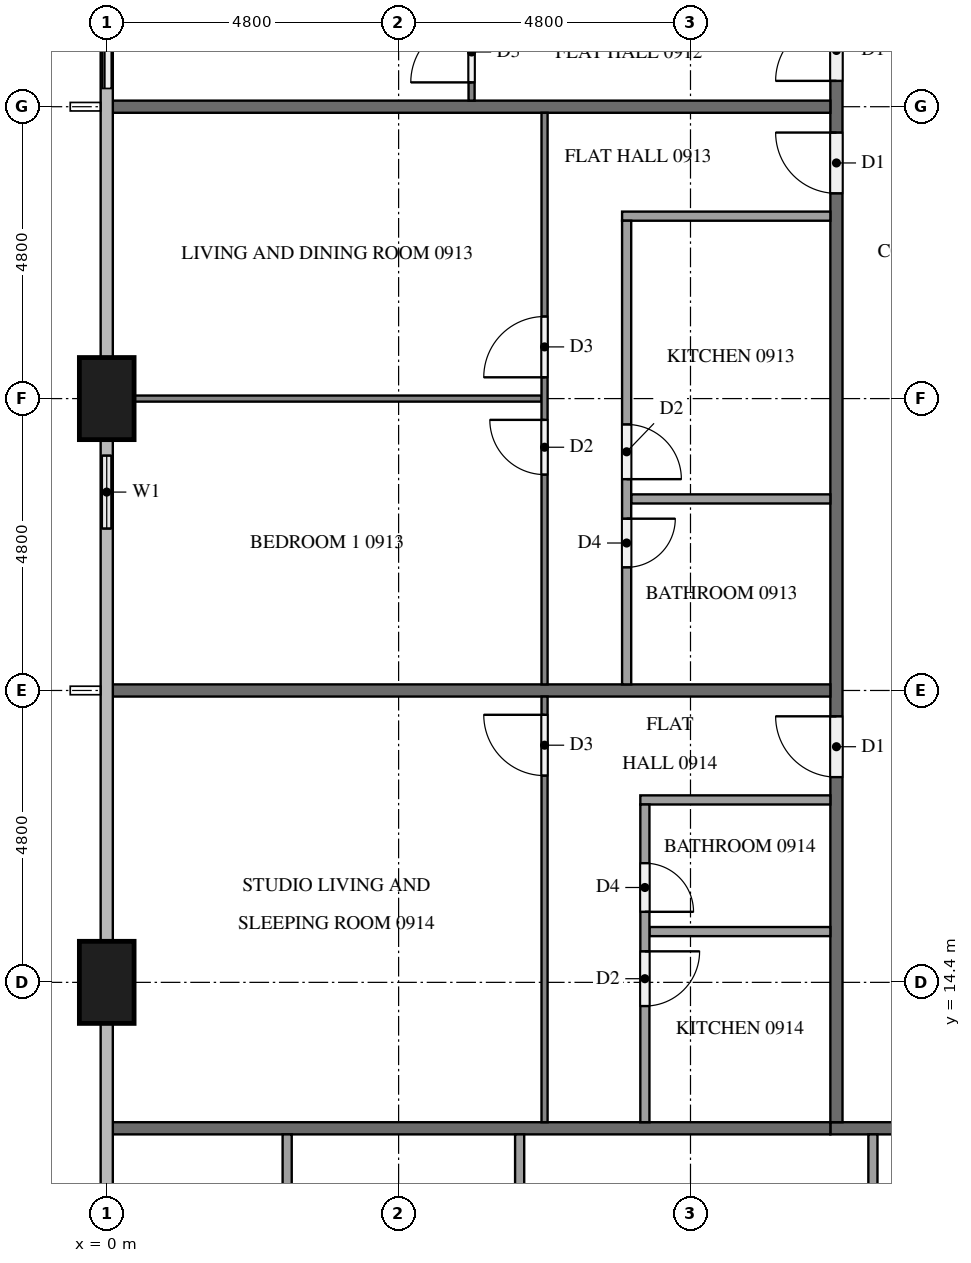
"""IFC4 building model, lengths in metres.
Left out: names, types, materials, properties, quantities, classifications, styles, units other than length and angle.
Written with IfcOpenShell. Run it as: python <this file> out.ifc"""

import sys

from ifc_helpers import new_model, si_unit, direction, frame, frame_2d, origin, origin_2d, place, context, subcontext, project, spatial, rectangle, extrude, element, fill, save


model = new_model("IFC4")
c1 = context("Model", 3, precision=1e-05, world=origin(), true_north=direction((0.0, 1.0)))
c2 = subcontext(c1, "Body", "Model", "MODEL_VIEW")
j1 = project(units=[si_unit("LENGTHUNIT", "METRE"), si_unit("PLANEANGLEUNIT", "RADIAN")], contexts=[c1])
p1 = place(None, origin())
s1 = spatial("IfcSite", under=j1, at=p1, CompositionType="ELEMENT")
p2 = place(p1, origin())
s2 = spatial("IfcBuilding", under=s1, at=p2, CompositionType="ELEMENT")
p3 = place(p2, frame((0.0, 0.0, 39.9)))
s3 = spatial("IfcBuildingStorey", under=s2, at=p3, CompositionType="ELEMENT", Elevation=39.9)
for number, where, z_axis, x_axis in (
    (1, (0.0, 24.0, 0.0), (0.0, 0.0, 1.0), (0.0, 1.0, 0.0)),
    (2, (0.0, 14.4, 0.0), (0.0, 0.0, 1.0), (0.0, 1.0, 0.0)),
):
    element("IfcColumn", number, at=place(p3, frame(where, z_axis=z_axis, x_axis=x_axis)), inside=s3, PredefinedType="COLUMN", context=c2, shape_type="SweptSolid", body=[
        extrude(rectangle(XDim=1.35, YDim=0.9, at=origin_2d()), origin(), (0.0, 0.0, 1.0), 3.2),
    ])
p4 = place(p3, frame((0.0, 31.2, 0.0), z_axis=(0.0, 0.0, 1.0), x_axis=(0.0, -1.0, 0.0)))
e3 = element("IfcWall", 3, at=p4, inside=s3, PredefinedType="SOLIDWALL", context=c2, shape_type="SweptSolid", body=[
    extrude(rectangle(XDim=2.4, YDim=0.15, at=frame_2d((1.2, 0.0))), origin(), (0.0, 0.0, 1.0), 3.2),
])
p5 = place(p4, frame((0.3, 0.0, 0.0)))
e4 = element("IfcOpeningElement", 4, at=p5, cuts=e3, PredefinedType="OPENING", context=c2, shape_type="SweptSolid", body=[
    extrude(rectangle(XDim=1.8, YDim=2.4, at=frame_2d((0.9, 1.2))), frame((0.0, 0.085, 0.0), z_axis=(0.0, -1.0, 0.0), x_axis=(1.0, 0.0, 0.0)), (0.0, 0.0, 1.0), 0.17),
])
p6 = place(p3, frame((0.0, 23.325, 0.0), z_axis=(0.0, 0.0, 1.0), x_axis=(0.0, -1.0, 0.0)))
e5 = element("IfcWall", 5, at=p6, inside=s3, PredefinedType="SOLIDWALL", context=c2, shape_type="SweptSolid", body=[
    extrude(rectangle(XDim=1.725, YDim=0.15, at=frame_2d((0.862, 0.0))), origin(), (0.0, 0.0, 1.0), 3.2),
])
p7 = place(p6, frame((0.262, 0.0, 0.9)))
e6 = element("IfcOpeningElement", 6, at=p7, cuts=e5, PredefinedType="OPENING", context=c2, shape_type="SweptSolid", body=[
    extrude(rectangle(XDim=1.2, YDim=1.4, at=frame_2d((0.6, 0.7))), frame((0.0, 0.085, 0.0), z_axis=(0.0, -1.0, 0.0), x_axis=(1.0, 0.0, 0.0)), (0.0, 0.0, 1.0), 0.17),
])
p8 = place(p3, frame((50.5, 12.0, 0.0), z_axis=(0.0, 0.0, 1.0), x_axis=(-1.0, 0.0, 0.0)))
e7 = element("IfcWall", 7, at=p8, inside=s3, PredefinedType="PARTITIONING", context=c2, shape_type="SweptSolid", body=[
    extrude(rectangle(XDim=38.6, YDim=0.2, at=frame_2d((19.3, 0.0))), origin(), (0.0, 0.0, 1.0), 3.2),
])
p9 = place(p8, frame((36.525, 0.0, 0.0)))
e8 = element("IfcOpeningElement", 8, at=p9, cuts=e7, PredefinedType="OPENING", context=c2, shape_type="SweptSolid", body=[
    extrude(rectangle(XDim=1.0, YDim=2.1, at=frame_2d((0.5, 1.05))), frame((0.0, 0.11, 0.0), z_axis=(0.0, -1.0, 0.0), x_axis=(1.0, 0.0, 0.0)), (0.0, 0.0, 1.0), 0.22),
])
p10 = place(p8, frame((24.525, 0.0, 0.0)))
e9 = element("IfcOpeningElement", 9, at=p10, cuts=e7, PredefinedType="OPENING", context=c2, shape_type="SweptSolid", body=[
    extrude(rectangle(XDim=1.0, YDim=2.1, at=frame_2d((0.5, 1.05))), frame((0.0, 0.11, 0.0), z_axis=(0.0, -1.0, 0.0), x_axis=(1.0, 0.0, 0.0)), (0.0, 0.0, 1.0), 0.22),
])
p11 = place(p8, frame((22.675, 0.0, 0.0)))
e10 = element("IfcOpeningElement", 10, at=p11, cuts=e7, PredefinedType="OPENING", context=c2, shape_type="SweptSolid", body=[
    extrude(rectangle(XDim=1.0, YDim=2.1, at=frame_2d((0.5, 1.05))), frame((0.0, 0.11, 0.0), z_axis=(0.0, -1.0, 0.0), x_axis=(1.0, 0.0, 0.0)), (0.0, 0.0, 1.0), 0.22),
])
p12 = place(p8, frame((8.275, 0.0, 0.0)))
e11 = element("IfcOpeningElement", 11, at=p12, cuts=e7, PredefinedType="OPENING", context=c2, shape_type="SweptSolid", body=[
    extrude(rectangle(XDim=1.0, YDim=2.1, at=frame_2d((0.5, 1.05))), frame((0.0, 0.11, 0.0), z_axis=(0.0, -1.0, 0.0), x_axis=(1.0, 0.0, 0.0)), (0.0, 0.0, 1.0), 0.22),
])
p13 = place(p3, frame((12.0, 12.1, 0.0), z_axis=(0.0, 0.0, 1.0), x_axis=(0.0, 1.0, 0.0)))
e12 = element("IfcWall", 12, at=p13, inside=s3, PredefinedType="PARTITIONING", context=c2, shape_type="SweptSolid", body=[
    extrude(rectangle(XDim=28.6, YDim=0.2, at=frame_2d((14.3, 0.0))), origin(), (0.0, 0.0, 1.0), 3.2),
])
p14 = place(p13, frame((26.725, 0.0, 0.0)))
e13 = element("IfcOpeningElement", 13, at=p14, cuts=e12, PredefinedType="OPENING", context=c2, shape_type="SweptSolid", body=[
    extrude(rectangle(XDim=1.0, YDim=2.1, at=frame_2d((0.5, 1.05))), frame((0.0, 0.11, 0.0), z_axis=(0.0, -1.0, 0.0), x_axis=(1.0, 0.0, 0.0)), (0.0, 0.0, 1.0), 0.22),
])
p15 = place(p13, frame((17.125, 0.0, 0.0)))
e14 = element("IfcOpeningElement", 14, at=p15, cuts=e12, PredefinedType="OPENING", context=c2, shape_type="SweptSolid", body=[
    extrude(rectangle(XDim=1.0, YDim=2.1, at=frame_2d((0.5, 1.05))), frame((0.0, 0.11, 0.0), z_axis=(0.0, -1.0, 0.0), x_axis=(1.0, 0.0, 0.0)), (0.0, 0.0, 1.0), 0.22),
])
p16 = place(p13, frame((15.275, 0.0, 0.0)))
e15 = element("IfcOpeningElement", 15, at=p16, cuts=e12, PredefinedType="OPENING", context=c2, shape_type="SweptSolid", body=[
    extrude(rectangle(XDim=1.0, YDim=2.1, at=frame_2d((0.5, 1.05))), frame((0.0, 0.11, 0.0), z_axis=(0.0, -1.0, 0.0), x_axis=(1.0, 0.0, 0.0)), (0.0, 0.0, 1.0), 0.22),
])
p17 = place(p13, frame((5.675, 0.0, 0.0)))
e16 = element("IfcOpeningElement", 16, at=p17, cuts=e12, PredefinedType="OPENING", context=c2, shape_type="SweptSolid", body=[
    extrude(rectangle(XDim=1.0, YDim=2.1, at=frame_2d((0.5, 1.05))), frame((0.0, 0.11, 0.0), z_axis=(0.0, -1.0, 0.0), x_axis=(1.0, 0.0, 0.0)), (0.0, 0.0, 1.0), 0.22),
])
for number, where, z_axis, x_axis in (
    (17, (0.1, 12.0, 0.0), (0.0, 0.0, 1.0), (1.0, 0.0, 0.0)),
    (18, (0.1, 28.8, 0.0), (0.0, 0.0, 1.0), (1.0, 0.0, 0.0)),
    (19, (0.1, 19.2, 0.0), (0.0, 0.0, 1.0), (1.0, 0.0, 0.0)),
):
    element("IfcWall", number, at=place(p3, frame(where, z_axis=z_axis, x_axis=x_axis)), inside=s3, PredefinedType="PARTITIONING", context=c2, shape_type="SweptSolid", body=[
        extrude(rectangle(XDim=11.8, YDim=0.2, at=frame_2d((5.9, 0.0))), origin(), (0.0, 0.0, 1.0), 3.2),
    ])
for number, where, z_axis, x_axis in (
    (20, (6.79, 11.9, 0.0), (0.0, 0.0, 1.0), (0.0, -1.0, 0.0)),
    (21, (2.967, 11.9, 0.0), (0.0, 0.0, 1.0), (0.0, -1.0, 0.0)),
):
    element("IfcWall", number, at=place(p3, frame(where, z_axis=z_axis, x_axis=x_axis)), inside=s3, PredefinedType="PARTITIONING", context=c2, shape_type="SweptSolid", body=[
        extrude(rectangle(XDim=3.725, YDim=0.15, at=frame_2d((1.862, 0.0))), origin(), (0.0, 0.0, 1.0), 3.2),
    ])
p18 = place(p3, frame((12.6, 11.9, 0.0), z_axis=(0.0, 0.0, 1.0), x_axis=(0.0, -1.0, 0.0)))
e22 = element("IfcWall", 22, at=p18, inside=s3, PredefinedType="PARTITIONING", context=c2, shape_type="SweptSolid", body=[
    extrude(rectangle(XDim=3.875, YDim=0.15, at=frame_2d((1.938, 0.0))), origin(), (0.0, 0.0, 1.0), 3.2),
])
p19 = place(p3, frame((6.0, 28.9, 0.0), z_axis=(0.0, 0.0, 1.0), x_axis=(0.0, 1.0, 0.0)))
e23 = element("IfcWall", 23, at=p19, inside=s3, PredefinedType="PARTITIONING", context=c2, shape_type="SweptSolid", body=[
    extrude(rectangle(XDim=9.4, YDim=0.1, at=frame_2d((4.7, 0.0))), origin(), (0.0, 0.0, 1.0), 3.2),
])
p20 = place(p19, frame((0.3, 0.0, 0.0)))
e24 = element("IfcOpeningElement", 24, at=p20, cuts=e23, PredefinedType="OPENING", context=c2, shape_type="SweptSolid", body=[
    extrude(rectangle(XDim=1.0, YDim=2.1, at=frame_2d((0.5, 1.05))), frame((0.0, 0.06, 0.0), z_axis=(0.0, -1.0, 0.0), x_axis=(1.0, 0.0, 0.0)), (0.0, 0.0, 1.0), 0.12),
])
p21 = place(p19, frame((8.2, 0.0, 0.0)))
e25 = element("IfcOpeningElement", 25, at=p21, cuts=e23, PredefinedType="OPENING", context=c2, shape_type="SweptSolid", body=[
    extrude(rectangle(XDim=0.9, YDim=2.1, at=frame_2d((0.45, 1.05))), frame((0.0, 0.06, 0.0), z_axis=(0.0, -1.0, 0.0), x_axis=(1.0, 0.0, 0.0)), (0.0, 0.0, 1.0), 0.12),
])
p22 = place(p3, frame((7.15, 24.0, 0.0), z_axis=(0.0, 0.0, 1.0), x_axis=(-1.0, 0.0, 0.0)))
e26 = element("IfcWall", 26, at=p22, inside=s3, PredefinedType="PARTITIONING", context=c2, shape_type="SweptSolid", body=[
    extrude(rectangle(XDim=6.7, YDim=0.1, at=frame_2d((3.35, 0.0))), origin(), (0.0, 0.0, 1.0), 3.2),
])
p23 = place(p3, frame((7.2, 19.3, 0.0), z_axis=(0.0, 0.0, 1.0), x_axis=(0.0, 1.0, 0.0)))
e27 = element("IfcWall", 27, at=p23, inside=s3, PredefinedType="PARTITIONING", context=c2, shape_type="SweptSolid", body=[
    extrude(rectangle(XDim=9.4, YDim=0.1, at=frame_2d((4.7, 0.0))), origin(), (0.0, 0.0, 1.0), 3.2),
])
p24 = place(p23, frame((5.05, 0.0, 0.0)))
e28 = element("IfcOpeningElement", 28, at=p24, cuts=e27, PredefinedType="OPENING", context=c2, shape_type="SweptSolid", body=[
    extrude(rectangle(XDim=1.0, YDim=2.1, at=frame_2d((0.5, 1.05))), frame((0.0, 0.06, 0.0), z_axis=(0.0, -1.0, 0.0), x_axis=(1.0, 0.0, 0.0)), (0.0, 0.0, 1.0), 0.12),
])
p25 = place(p23, frame((3.45, 0.0, 0.0)))
e29 = element("IfcOpeningElement", 29, at=p25, cuts=e27, PredefinedType="OPENING", context=c2, shape_type="SweptSolid", body=[
    extrude(rectangle(XDim=0.9, YDim=2.1, at=frame_2d((0.45, 1.05))), frame((0.0, 0.06, 0.0), z_axis=(0.0, -1.0, 0.0), x_axis=(1.0, 0.0, 0.0)), (0.0, 0.0, 1.0), 0.12),
])
p26 = place(p3, frame((11.9, 22.35, 0.0), z_axis=(0.0, 0.0, 1.0), x_axis=(-1.0, 0.0, 0.0)))
e30 = element("IfcWall", 30, at=p26, inside=s3, PredefinedType="PARTITIONING", context=c2, shape_type="SweptSolid", body=[
    extrude(rectangle(XDim=3.275, YDim=0.15, at=frame_2d((1.637, 0.0))), origin(), (0.0, 0.0, 1.0), 3.2),
])
p27 = place(p3, frame((11.9, 27.0, 0.0), z_axis=(0.0, 0.0, 1.0), x_axis=(-1.0, 0.0, 0.0)))
e31 = element("IfcWall", 31, at=p27, inside=s3, PredefinedType="PARTITIONING", context=c2, shape_type="SweptSolid", body=[
    extrude(rectangle(XDim=3.425, YDim=0.15, at=frame_2d((1.712, 0.0))), origin(), (0.0, 0.0, 1.0), 3.2),
])
p28 = place(p3, frame((8.55, 26.925, 0.0), z_axis=(0.0, 0.0, 1.0), x_axis=(0.0, -1.0, 0.0)))
e32 = element("IfcWall", 32, at=p28, inside=s3, PredefinedType="PARTITIONING", context=c2, shape_type="SweptSolid", body=[
    extrude(rectangle(XDim=7.625, YDim=0.15, at=frame_2d((3.812, 0.0))), origin(), (0.0, 0.0, 1.0), 3.2),
])
p29 = place(p28, frame((3.35, 0.0, 0.0)))
e33 = element("IfcOpeningElement", 33, at=p29, cuts=e32, PredefinedType="OPENING", context=c2, shape_type="SweptSolid", body=[
    extrude(rectangle(XDim=0.9, YDim=2.1, at=frame_2d((0.45, 1.05))), frame((0.0, 0.085, 0.0), z_axis=(0.0, -1.0, 0.0), x_axis=(1.0, 0.0, 0.0)), (0.0, 0.0, 1.0), 0.17),
])
p30 = place(p28, frame((4.9, 0.0, 0.0)))
e34 = element("IfcOpeningElement", 34, at=p30, cuts=e32, PredefinedType="OPENING", context=c2, shape_type="SweptSolid", body=[
    extrude(rectangle(XDim=0.8, YDim=2.1, at=frame_2d((0.4, 1.05))), frame((0.0, 0.085, 0.0), z_axis=(0.0, -1.0, 0.0), x_axis=(1.0, 0.0, 0.0)), (0.0, 0.0, 1.0), 0.17),
])
p31 = place(p3, frame((7.2, 12.1, 0.0), z_axis=(0.0, 0.0, 1.0), x_axis=(0.0, 1.0, 0.0)))
e35 = element("IfcWall", 35, at=p31, inside=s3, PredefinedType="PARTITIONING", context=c2, shape_type="SweptSolid", body=[
    extrude(rectangle(XDim=7.0, YDim=0.1, at=frame_2d((3.5, 0.0))), origin(), (0.0, 0.0, 1.0), 3.2),
])
p32 = place(p31, frame((5.7, 0.0, 0.0)))
e36 = element("IfcOpeningElement", 36, at=p32, cuts=e35, PredefinedType="OPENING", context=c2, shape_type="SweptSolid", body=[
    extrude(rectangle(XDim=1.0, YDim=2.1, at=frame_2d((0.5, 1.05))), frame((0.0, 0.06, 0.0), z_axis=(0.0, -1.0, 0.0), x_axis=(1.0, 0.0, 0.0)), (0.0, 0.0, 1.0), 0.12),
])
p33 = place(p3, frame((11.9, 15.235, 0.0), z_axis=(0.0, 0.0, 1.0), x_axis=(-1.0, 0.0, 0.0)))
e37 = element("IfcWall", 37, at=p33, inside=s3, PredefinedType="PARTITIONING", context=c2, shape_type="SweptSolid", body=[
    extrude(rectangle(XDim=2.975, YDim=0.15, at=frame_2d((1.487, 0.0))), origin(), (0.0, 0.0, 1.0), 3.2),
])
p34 = place(p3, frame((11.9, 17.4, 0.0), z_axis=(0.0, 0.0, 1.0), x_axis=(-1.0, 0.0, 0.0)))
e38 = element("IfcWall", 38, at=p34, inside=s3, PredefinedType="PARTITIONING", context=c2, shape_type="SweptSolid", body=[
    extrude(rectangle(XDim=3.125, YDim=0.15, at=frame_2d((1.562, 0.0))), origin(), (0.0, 0.0, 1.0), 3.2),
])
p35 = place(p3, frame((8.85, 17.325, 0.0), z_axis=(0.0, 0.0, 1.0), x_axis=(0.0, -1.0, 0.0)))
e39 = element("IfcWall", 39, at=p35, inside=s3, PredefinedType="PARTITIONING", context=c2, shape_type="SweptSolid", body=[
    extrude(rectangle(XDim=5.225, YDim=0.15, at=frame_2d((2.612, 0.0))), origin(), (0.0, 0.0, 1.0), 3.2),
])
p36 = place(p35, frame((0.965, 0.0, 0.0)))
e40 = element("IfcOpeningElement", 40, at=p36, cuts=e39, PredefinedType="OPENING", context=c2, shape_type="SweptSolid", body=[
    extrude(rectangle(XDim=0.8, YDim=2.1, at=frame_2d((0.4, 1.05))), frame((0.0, 0.085, 0.0), z_axis=(0.0, -1.0, 0.0), x_axis=(1.0, 0.0, 0.0)), (0.0, 0.0, 1.0), 0.17),
])
p37 = place(p35, frame((2.415, 0.0, 0.0)))
e41 = element("IfcOpeningElement", 41, at=p37, cuts=e39, PredefinedType="OPENING", context=c2, shape_type="SweptSolid", body=[
    extrude(rectangle(XDim=0.9, YDim=2.1, at=frame_2d((0.45, 1.05))), frame((0.0, 0.085, 0.0), z_axis=(0.0, -1.0, 0.0), x_axis=(1.0, 0.0, 0.0)), (0.0, 0.0, 1.0), 0.17),
])
p38 = place(p5, origin())
e42 = element("IfcDoor", 42, at=p38, inside=s3, OperationType="SLIDING_TO_RIGHT", PredefinedType="DOOR", context=c2, shape_type="SweptSolid", body=[
    extrude(rectangle(XDim=1.8, YDim=2.4, at=frame_2d((0.9, 1.2))), frame((0.0, 0.025, 0.0), z_axis=(0.0, -1.0, 0.0), x_axis=(1.0, 0.0, 0.0)), (0.0, 0.0, 1.0), 0.05),
])
fill(e4, e42)
p39 = place(p7, origin())
e43 = element("IfcWindow", 43, at=p39, inside=s3, PartitioningType="SINGLE_PANEL", PredefinedType="WINDOW", context=c2, shape_type="SweptSolid", body=[
    extrude(rectangle(XDim=1.2, YDim=1.4, at=frame_2d((0.6, 0.7))), frame((0.0, 0.03, 0.0), z_axis=(0.0, -1.0, 0.0), x_axis=(1.0, 0.0, 0.0)), (0.0, 0.0, 1.0), 0.06),
])
fill(e6, e43)
p40 = place(p15, origin())
e44 = element("IfcDoor", 44, at=p40, inside=s3, OperationType="SINGLE_SWING_LEFT", PredefinedType="DOOR", context=c2, shape_type="SweptSolid", body=[
    extrude(rectangle(XDim=1.0, YDim=2.1, at=frame_2d((0.5, 1.05))), frame((0.0, 0.025, 0.0), z_axis=(0.0, -1.0, 0.0), x_axis=(1.0, 0.0, 0.0)), (0.0, 0.0, 1.0), 0.05),
])
fill(e14, e44)
p41 = place(p16, origin())
e45 = element("IfcDoor", 45, at=p41, inside=s3, OperationType="SINGLE_SWING_RIGHT", PredefinedType="DOOR", context=c2, shape_type="SweptSolid", body=[
    extrude(rectangle(XDim=1.0, YDim=2.1, at=frame_2d((0.5, 1.05))), frame((0.0, 0.025, 0.0), z_axis=(0.0, -1.0, 0.0), x_axis=(1.0, 0.0, 0.0)), (0.0, 0.0, 1.0), 0.05),
])
fill(e15, e45)
p42 = place(p17, origin())
e46 = element("IfcDoor", 46, at=p42, inside=s3, OperationType="SINGLE_SWING_RIGHT", PredefinedType="DOOR", context=c2, shape_type="SweptSolid", body=[
    extrude(rectangle(XDim=1.0, YDim=2.1, at=frame_2d((0.5, 1.05))), frame((0.0, 0.025, 0.0), z_axis=(0.0, -1.0, 0.0), x_axis=(1.0, 0.0, 0.0)), (0.0, 0.0, 1.0), 0.05),
])
fill(e16, e46)
p43 = place(p20, origin())
e47 = element("IfcDoor", 47, at=p43, inside=s3, OperationType="SINGLE_SWING_LEFT", PredefinedType="DOOR", context=c2, shape_type="SweptSolid", body=[
    extrude(rectangle(XDim=1.0, YDim=2.1, at=frame_2d((0.5, 1.05))), frame((0.0, 0.025, 0.0), z_axis=(0.0, -1.0, 0.0), x_axis=(1.0, 0.0, 0.0)), (0.0, 0.0, 1.0), 0.05),
])
fill(e24, e47)
p44 = place(p24, origin())
e48 = element("IfcDoor", 48, at=p44, inside=s3, OperationType="SINGLE_SWING_LEFT", PredefinedType="DOOR", context=c2, shape_type="SweptSolid", body=[
    extrude(rectangle(XDim=1.0, YDim=2.1, at=frame_2d((0.5, 1.05))), frame((0.0, 0.025, 0.0), z_axis=(0.0, -1.0, 0.0), x_axis=(1.0, 0.0, 0.0)), (0.0, 0.0, 1.0), 0.05),
])
fill(e28, e48)
p45 = place(p25, origin())
e49 = element("IfcDoor", 49, at=p45, inside=s3, OperationType="SINGLE_SWING_RIGHT", PredefinedType="DOOR", context=c2, shape_type="SweptSolid", body=[
    extrude(rectangle(XDim=0.9, YDim=2.1, at=frame_2d((0.45, 1.05))), frame((0.0, 0.025, 0.0), z_axis=(0.0, -1.0, 0.0), x_axis=(1.0, 0.0, 0.0)), (0.0, 0.0, 1.0), 0.05),
])
fill(e29, e49)
p46 = place(p29, origin())
e50 = element("IfcDoor", 50, at=p46, inside=s3, OperationType="SINGLE_SWING_RIGHT", PredefinedType="DOOR", context=c2, shape_type="SweptSolid", body=[
    extrude(rectangle(XDim=0.9, YDim=2.1, at=frame_2d((0.45, 1.05))), frame((0.0, 0.025, 0.0), z_axis=(0.0, -1.0, 0.0), x_axis=(1.0, 0.0, 0.0)), (0.0, 0.0, 1.0), 0.05),
])
fill(e33, e50)
p47 = place(p30, origin())
e51 = element("IfcDoor", 51, at=p47, inside=s3, OperationType="SINGLE_SWING_LEFT", PredefinedType="DOOR", context=c2, shape_type="SweptSolid", body=[
    extrude(rectangle(XDim=0.8, YDim=2.1, at=frame_2d((0.4, 1.05))), frame((0.0, 0.025, 0.0), z_axis=(0.0, -1.0, 0.0), x_axis=(1.0, 0.0, 0.0)), (0.0, 0.0, 1.0), 0.05),
])
fill(e34, e51)
p48 = place(p32, origin())
e52 = element("IfcDoor", 52, at=p48, inside=s3, OperationType="SINGLE_SWING_RIGHT", PredefinedType="DOOR", context=c2, shape_type="SweptSolid", body=[
    extrude(rectangle(XDim=1.0, YDim=2.1, at=frame_2d((0.5, 1.05))), frame((0.0, 0.025, 0.0), z_axis=(0.0, -1.0, 0.0), x_axis=(1.0, 0.0, 0.0)), (0.0, 0.0, 1.0), 0.05),
])
fill(e36, e52)
p49 = place(p36, origin())
e53 = element("IfcDoor", 53, at=p49, inside=s3, OperationType="SINGLE_SWING_RIGHT", PredefinedType="DOOR", context=c2, shape_type="SweptSolid", body=[
    extrude(rectangle(XDim=0.8, YDim=2.1, at=frame_2d((0.4, 1.05))), frame((0.0, 0.025, 0.0), z_axis=(0.0, -1.0, 0.0), x_axis=(1.0, 0.0, 0.0)), (0.0, 0.0, 1.0), 0.05),
])
fill(e40, e53)
p50 = place(p37, origin())
e54 = element("IfcDoor", 54, at=p50, inside=s3, OperationType="SINGLE_SWING_LEFT", PredefinedType="DOOR", context=c2, shape_type="SweptSolid", body=[
    extrude(rectangle(XDim=0.9, YDim=2.1, at=frame_2d((0.45, 1.05))), frame((0.0, 0.025, 0.0), z_axis=(0.0, -1.0, 0.0), x_axis=(1.0, 0.0, 0.0)), (0.0, 0.0, 1.0), 0.05),
])
fill(e41, e54)
save(model, sys.argv[1])
